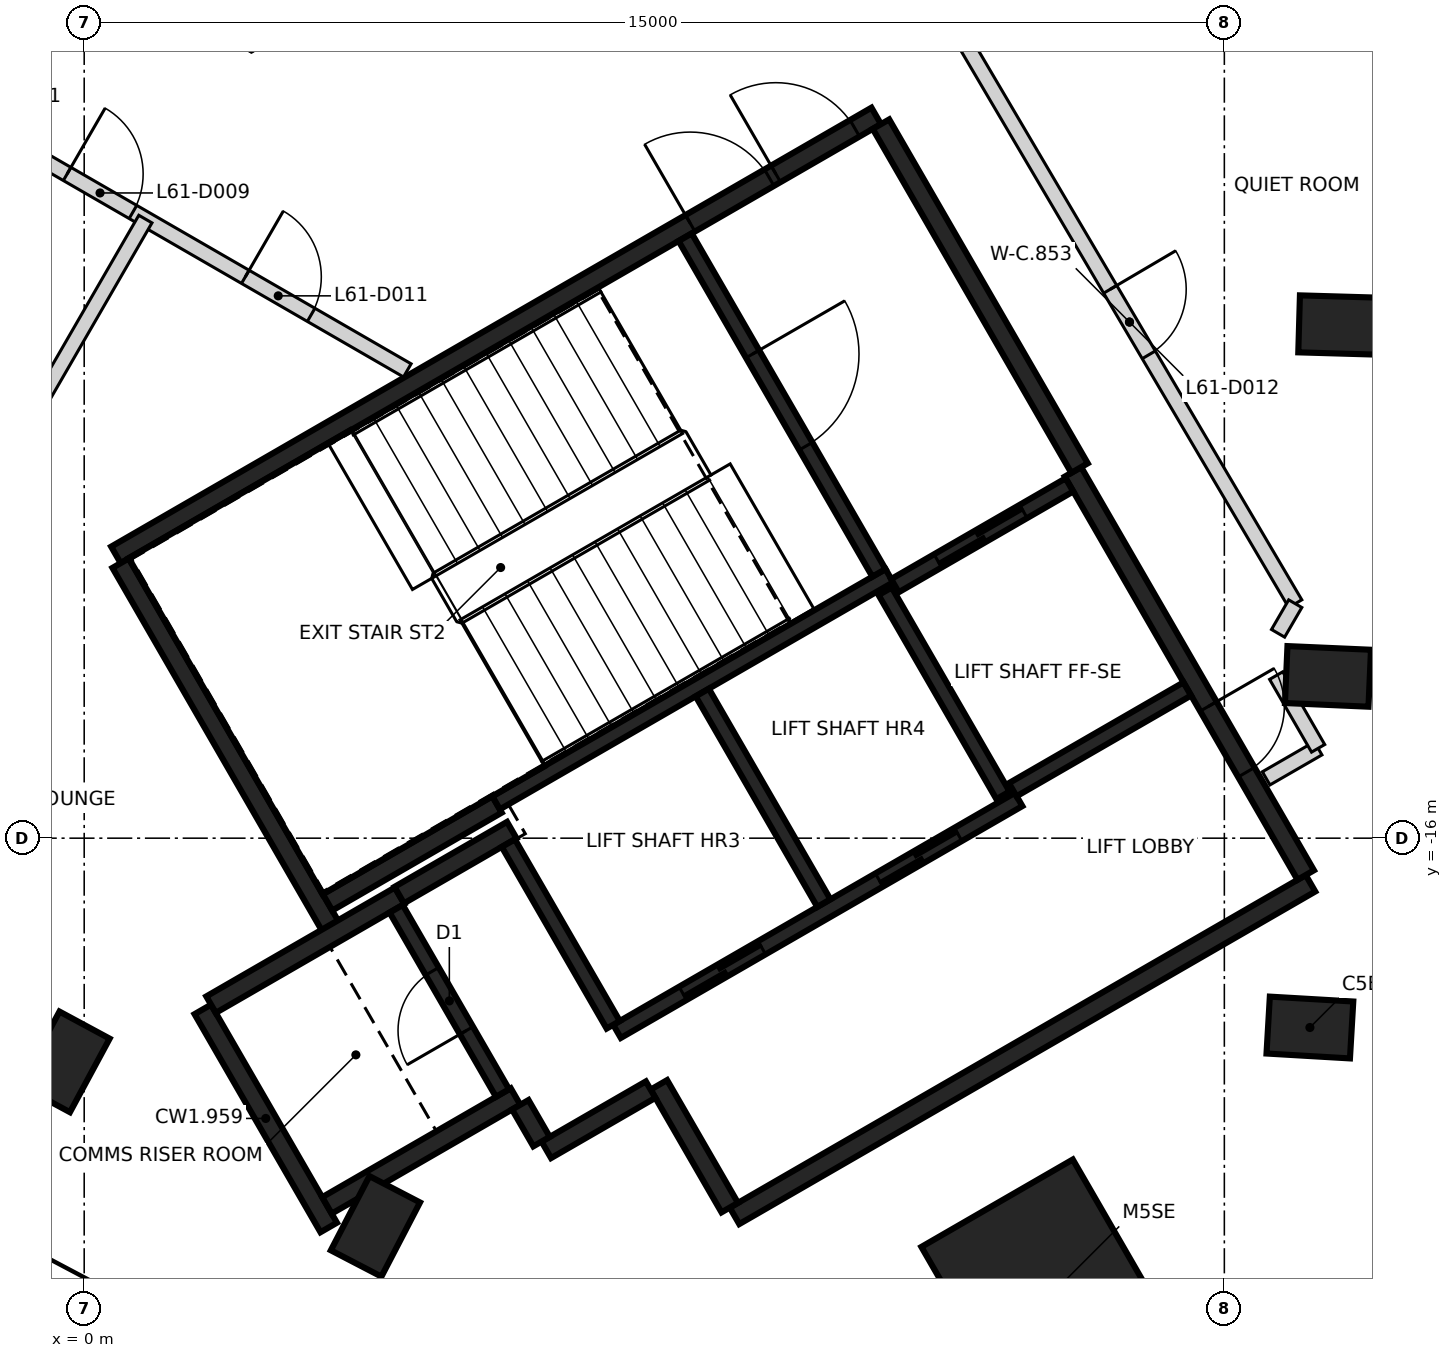
"""IFC4 building model, lengths in metres.
Left out: names, types, materials, properties, quantities, classifications, styles, units other than length and angle.
Written with IfcOpenShell. Run it as: python <this file> out.ifc"""

import sys

from ifc_helpers import new_model, si_unit, direction, frame, frame_2d, origin, origin_2d, place, context, subcontext, project, spatial, rectangle, extrude, element, fill, save


model = new_model("IFC4")
c1 = context("Model", 3, precision=1e-05, world=origin(), true_north=direction((0.0, 1.0)))
c2 = subcontext(c1, "Body", "Model", "MODEL_VIEW")
j1 = project(units=[si_unit("LENGTHUNIT", "METRE"), si_unit("PLANEANGLEUNIT", "RADIAN")], contexts=[c1])
p1 = place(None, origin())
s1 = spatial("IfcSite", under=j1, at=p1, CompositionType="ELEMENT")
p2 = place(p1, origin())
s2 = spatial("IfcBuilding", under=s1, at=p2, CompositionType="ELEMENT")
p3 = place(p2, frame((0.0, 0.0, 243.0)))
s3 = spatial("IfcBuildingStorey", under=s2, at=p3, CompositionType="ELEMENT", Elevation=243.0)
for number, where, z_axis, x_axis in (
    (1, (16.125, -18.491, -0.35), (0.0, 0.0, 1.0), (-0.998, 0.058, 0.0)),
    (2, (16.363, -13.872, -0.35), (0.0, 0.0, 1.0), (-0.999, 0.044, 0.0)),
    (3, (16.533, -9.25, -0.35), (0.0, 0.0, 1.0), (-1.0, 0.029, 0.0)),
    (4, (-0.256, -18.943, -0.35), (0.0, 0.0, 1.0), (0.475, 0.88, 0.0)),
    (5, (3.832, -21.107, -0.35), (0.0, 0.0, 1.0), (0.461, 0.887, 0.0)),
):
    element("IfcColumn", number, at=place(p3, frame(where, z_axis=z_axis, x_axis=x_axis)), inside=s3, PredefinedType="COLUMN", context=c2, shape_type="SweptSolid", body=[
        extrude(rectangle(XDim=1.1, YDim=0.75, at=origin_2d()), origin(), (0.0, 0.0, 1.0), 3.6),
    ])
p4 = place(p3, frame((12.71, -22.015, -0.35), z_axis=(0.0, 0.0, 1.0), x_axis=(-0.5, 0.866025403784, 0.0)))
e6 = element("IfcColumn", 6, at=p4, inside=s3, PredefinedType="COLUMN", context=c2, shape_type="SweptSolid", body=[
    extrude(rectangle(XDim=2.8, YDim=2.3, at=origin_2d()), origin(), (0.0, 0.0, 1.0), 3.6),
])
p5 = place(p3, frame((0.417, -12.273, 0.0), z_axis=(0.0, 0.0, 1.0), x_axis=(0.866021906294, 0.500006057782, 0.0)))
e7 = element("IfcWall", 7, at=p5, inside=s3, PredefinedType="SHEAR", context=c2, shape_type="SweptSolid", body=[
    extrude(rectangle(XDim=11.55, YDim=0.25, at=frame_2d((5.775, 0.0))), origin(), (0.0, 0.0, 1.0), 3.25),
])
p6 = place(p5, frame((10.025, 0.0, 0.0)))
e8 = element("IfcOpeningElement", 8, at=p6, cuts=e7, PredefinedType="OPENING", context=c2, shape_type="SweptSolid", body=[
    extrude(rectangle(XDim=1.2, YDim=2.1, at=frame_2d((0.6, 1.05))), frame((0.0, 0.135, 0.0), z_axis=(0.0, -1.0, 0.0), x_axis=(1.0, 0.0, 0.0)), (0.0, 0.0, 1.0), 0.27),
])
p7 = place(p5, frame((8.725, 0.0, 0.0)))
e9 = element("IfcOpeningElement", 9, at=p7, cuts=e7, PredefinedType="OPENING", context=c2, shape_type="SweptSolid", body=[
    extrude(rectangle(XDim=1.2, YDim=2.1, at=frame_2d((0.6, 1.05))), frame((0.0, 0.135, 0.0), z_axis=(0.0, -1.0, 0.0), x_axis=(1.0, 0.0, 0.0)), (0.0, 0.0, 1.0), 0.27),
])
p8 = place(p3, frame((16.133, -16.594, 0.0), z_axis=(0.0, 0.0, 1.0), x_axis=(-0.866022959057, -0.500004234368, 0.0)))
e10 = element("IfcWall", 10, at=p8, inside=s3, PredefinedType="SHEAR", context=c2, shape_type="SweptSolid", body=[
    extrude(rectangle(XDim=8.75, YDim=0.25, at=frame_2d((4.375, 0.0))), origin(), (0.0, 0.0, 1.0), 3.25),
])
p9 = place(p3, frame((13.008, -11.181, 0.0), z_axis=(0.0, 0.0, 1.0), x_axis=(0.500001955336, -0.866024274868, 0.0)))
e11 = element("IfcWall", 11, at=p9, inside=s3, PredefinedType="SHEAR", context=c2, shape_type="SweptSolid", body=[
    extrude(rectangle(XDim=6.125, YDim=0.25, at=frame_2d((3.062, 0.0))), origin(), (0.0, 0.0, 1.0), 3.25),
])
p10 = place(p9, frame((3.563, 0.0, 0.0)))
e12 = element("IfcOpeningElement", 12, at=p10, cuts=e11, PredefinedType="OPENING", context=c2, shape_type="SweptSolid", body=[
    extrude(rectangle(XDim=1.0, YDim=2.1, at=frame_2d((0.5, 1.05))), frame((0.0, 0.135, 0.0), z_axis=(0.0, -1.0, 0.0), x_axis=(1.0, 0.0, 0.0)), (0.0, 0.0, 1.0), 0.27),
])
p11 = place(p3, frame((3.235, -17.153, 0.0), z_axis=(0.0, 0.0, 1.0), x_axis=(-0.500008851346, 0.866020293397, 0.0)))
e13 = element("IfcWall", 13, at=p11, inside=s3, PredefinedType="SHEAR", context=c2, shape_type="SweptSolid", body=[
    extrude(rectangle(XDim=5.51, YDim=0.25, at=frame_2d((2.755, 0.0))), origin(), (0.0, 0.0, 1.0), 3.25),
])
p12 = place(p3, frame((10.483, -6.606, 0.0), z_axis=(0.0, 0.0, 1.0), x_axis=(0.49999885962, -0.866026062182, 0.0)))
e14 = element("IfcWall", 14, at=p12, inside=s3, PredefinedType="SHEAR", context=c2, shape_type="SweptSolid", body=[
    extrude(rectangle(XDim=5.225, YDim=0.25, at=frame_2d((2.612, 0.0))), origin(), (0.0, 0.0, 1.0), 3.25),
])
p13 = place(p3, frame((3.217, -21.122, 0.0), z_axis=(0.0, 0.0, 1.0), x_axis=(-0.499998874531, 0.866026053573, 0.0)))
e15 = element("IfcWall", 15, at=p13, inside=s3, PredefinedType="SHEAR", context=c2, shape_type="SweptSolid", body=[
    extrude(rectangle(XDim=3.313, YDim=0.25, at=frame_2d((1.656, 0.0))), origin(), (0.0, 0.0, 1.0), 3.25),
])
p14 = place(p3, frame((1.669, -18.19, 0.0), z_axis=(0.0, 0.0, 1.0), x_axis=(0.866042235819, 0.499970844928, 0.0)))
e16 = element("IfcWall", 16, at=p14, inside=s3, PredefinedType="SHEAR", context=c2, shape_type="SweptSolid", body=[
    extrude(rectangle(XDim=2.865, YDim=0.25, at=frame_2d((1.432, 0.0))), origin(), (0.0, 0.0, 1.0), 3.25),
])
p15 = place(p3, frame((5.675, -19.399, 0.0), z_axis=(0.0, 0.0, 1.0), x_axis=(-0.866026637627, -0.499997862916, 0.0)))
e17 = element("IfcWall", 17, at=p15, inside=s3, PredefinedType="SHEAR", context=c2, shape_type="SweptSolid", body=[
    extrude(rectangle(XDim=2.865, YDim=0.25, at=frame_2d((1.432, 0.0))), origin(), (0.0, 0.0, 1.0), 3.25),
])
p16 = place(p3, frame((5.431, -15.556, 0.0), z_axis=(0.0, 0.0, 1.0), x_axis=(-0.866022940537, -0.500004266446, 0.0)))
e18 = element("IfcWall", 18, at=p16, inside=s3, PredefinedType="SHEAR", context=c2, shape_type="SweptSolid", body=[
    extrude(rectangle(XDim=2.575, YDim=0.25, at=frame_2d((1.287, 0.0))), origin(), (0.0, 0.0, 1.0), 3.25),
])
p17 = place(p3, frame((8.493, -20.86, 0.0), z_axis=(0.0, 0.0, 1.0), x_axis=(-0.500039802285, 0.866002422705, 0.0)))
e19 = element("IfcWall", 19, at=p17, inside=s3, PredefinedType="SHEAR", context=c2, shape_type="SweptSolid", body=[
    extrude(rectangle(XDim=1.865, YDim=0.25, at=frame_2d((0.932, 0.0))), origin(), (0.0, 0.0, 1.0), 3.25),
])
p18 = place(p3, frame((4.145, -16.749, 0.0), z_axis=(0.0, 0.0, 1.0), x_axis=(0.866038183914, 0.499977863513, 0.0)))
e20 = element("IfcWall", 20, at=p18, inside=s3, PredefinedType="SHEAR", context=c2, shape_type="SweptSolid", body=[
    extrude(rectangle(XDim=1.71, YDim=0.25, at=frame_2d((0.855, 0.0))), origin(), (0.0, 0.0, 1.0), 3.25),
])
p19 = place(p3, frame((7.452, -19.308, 0.0), z_axis=(0.0, 0.0, 1.0), x_axis=(-0.866044474677, -0.49996696679, 0.0)))
e21 = element("IfcWall", 21, at=p19, inside=s3, PredefinedType="SHEAR", context=c2, shape_type="SweptSolid", body=[
    extrude(rectangle(XDim=1.584, YDim=0.25, at=frame_2d((0.792, 0.0))), origin(), (0.0, 0.0, 1.0), 3.25),
])
p20 = place(p3, frame((6.017, -19.992, 0.0), z_axis=(0.0, 0.0, 1.0), x_axis=(-0.500364886717, 0.865814633822, 0.0)))
e22 = element("IfcWall", 22, at=p20, inside=s3, PredefinedType="SHEAR", context=c2, shape_type="SweptSolid", body=[
    extrude(rectangle(XDim=0.559, YDim=0.25, at=frame_2d((0.28, 0.0))), origin(), (0.0, 0.0, 1.0), 3.25),
])
p21 = place(p3, frame((5.419, -15.534, 0.0), z_axis=(0.0, 0.0, 1.0), x_axis=(0.866029065029, 0.499993658486, 0.0)))
e23 = element("IfcWall", 23, at=p21, inside=s3, PredefinedType="SHEAR", context=c2, shape_type="SweptSolid", body=[
    extrude(rectangle(XDim=5.974, YDim=0.2, at=frame_2d((2.987, 0.0))), origin(), (0.0, 0.0, 1.0), 3.25),
])
p22 = place(p3, frame((7.01, -18.542, 0.0), z_axis=(0.0, 0.0, 1.0), x_axis=(0.866030299012, 0.499991521122, 0.0)))
e24 = element("IfcWall", 24, at=p22, inside=s3, PredefinedType="SHEAR", context=c2, shape_type="SweptSolid", body=[
    extrude(rectangle(XDim=6.1, YDim=0.2, at=frame_2d((3.05, 0.0))), origin(), (0.0, 0.0, 1.0), 3.25),
])
p23 = place(p22, frame((1.0, 0.0, 0.0)))
e25 = element("IfcOpeningElement", 25, at=p23, cuts=e24, PredefinedType="OPENING", context=c2, shape_type="SweptSolid", body=[
    extrude(rectangle(XDim=1.2, YDim=2.1, at=frame_2d((0.6, 1.05))), frame((0.0, 0.11, 0.0), z_axis=(0.0, -1.0, 0.0), x_axis=(1.0, 0.0, 0.0)), (0.0, 0.0, 1.0), 0.22),
])
p24 = place(p22, frame((3.982, 0.0, 0.0)))
e26 = element("IfcOpeningElement", 26, at=p24, cuts=e24, PredefinedType="OPENING", context=c2, shape_type="SweptSolid", body=[
    extrude(rectangle(XDim=1.2, YDim=2.1, at=frame_2d((0.6, 1.05))), frame((0.0, 0.11, 0.0), z_axis=(0.0, -1.0, 0.0), x_axis=(1.0, 0.0, 0.0)), (0.0, 0.0, 1.0), 0.22),
])
p25 = place(p3, frame((7.906, -8.094, 0.0), z_axis=(0.0, 0.0, 1.0), x_axis=(0.500027839223, -0.866009330205, 0.0)))
e27 = element("IfcWall", 27, at=p25, inside=s3, PredefinedType="SHEAR", context=c2, shape_type="SweptSolid", body=[
    extrude(rectangle(XDim=5.098, YDim=0.2, at=frame_2d((2.549, 0.0))), origin(), (0.0, 0.0, 1.0), 3.25),
])
p26 = place(p25, frame((1.774, 0.0, 0.0)))
e28 = element("IfcOpeningElement", 28, at=p26, cuts=e27, PredefinedType="OPENING", context=c2, shape_type="SweptSolid", body=[
    extrude(rectangle(XDim=1.4, YDim=2.1, at=frame_2d((0.7, 1.05))), frame((0.0, 0.11, 0.0), z_axis=(0.0, -1.0, 0.0), x_axis=(1.0, 0.0, 0.0)), (0.0, 0.0, 1.0), 0.22),
])
p27 = place(p3, frame((8.132, -14.084, 0.0), z_axis=(0.0, 0.0, 1.0), x_axis=(0.499997778408, -0.866026686418, 0.0)))
e29 = element("IfcWall", 29, at=p27, inside=s3, PredefinedType="SHEAR", context=c2, shape_type="SweptSolid", body=[
    extrude(rectangle(XDim=3.198, YDim=0.2, at=frame_2d((1.599, 0.0))), origin(), (0.0, 0.0, 1.0), 3.25),
])
p28 = place(p3, frame((5.503, -19.352, 0.0), z_axis=(0.0, 0.0, 1.0), x_axis=(-0.499986818241, 0.866033014143, 0.0)))
e30 = element("IfcWall", 30, at=p28, inside=s3, PredefinedType="SHEAR", context=c2, shape_type="SweptSolid", body=[
    extrude(rectangle(XDim=2.798, YDim=0.2, at=frame_2d((1.399, 0.0))), origin(), (0.0, 0.0, 1.0), 3.25),
])
p29 = place(p28, frame((0.949, 0.0, 0.0)))
e31 = element("IfcOpeningElement", 31, at=p29, cuts=e30, PredefinedType="OPENING", context=c2, shape_type="SweptSolid", body=[
    extrude(rectangle(XDim=0.9, YDim=2.1, at=frame_2d((0.45, 1.05))), frame((0.0, 0.11, 0.0), z_axis=(0.0, -1.0, 0.0), x_axis=(1.0, 0.0, 0.0)), (0.0, 0.0, 1.0), 0.22),
])
p30 = place(p3, frame((6.96, -18.455, 0.0), z_axis=(0.0, 0.0, 1.0), x_axis=(-0.499926705758, 0.866067716099, 0.0)))
e32 = element("IfcWall", 32, at=p30, inside=s3, PredefinedType="SHEAR", context=c2, shape_type="SweptSolid", body=[
    extrude(rectangle(XDim=2.759, YDim=0.2, at=frame_2d((1.38, 0.0))), origin(), (0.0, 0.0, 1.0), 3.25),
])
p31 = place(p3, frame((12.088, -15.437, 0.0), z_axis=(0.0, 0.0, 1.0), x_axis=(-0.500026960575, 0.86600983753, 0.0)))
e33 = element("IfcWall", 33, at=p31, inside=s3, PredefinedType="SHEAR", context=c2, shape_type="SweptSolid", body=[
    extrude(rectangle(XDim=3.1, YDim=0.2, at=frame_2d((1.55, 0.0))), origin(), (0.0, 0.0, 1.0), 3.25),
])
p32 = place(p3, frame((10.666, -12.678, 0.0), z_axis=(0.0, 0.0, 1.0), x_axis=(0.866018407898, 0.500012117035, 0.0)))
e34 = element("IfcWall", 34, at=p32, inside=s3, PredefinedType="SHEAR", context=c2, shape_type="SweptSolid", body=[
    extrude(rectangle(XDim=2.651, YDim=0.2, at=frame_2d((1.325, 0.0))), origin(), (0.0, 0.0, 1.0), 3.25),
])
p33 = place(p32, frame((0.652, 0.0, 0.0)))
e35 = element("IfcOpeningElement", 35, at=p33, cuts=e34, PredefinedType="OPENING", context=c2, shape_type="SweptSolid", body=[
    extrude(rectangle(XDim=1.3, YDim=2.1, at=frame_2d((0.65, 1.05))), frame((0.0, 0.11, 0.0), z_axis=(0.0, -1.0, 0.0), x_axis=(1.0, 0.0, 0.0)), (0.0, 0.0, 1.0), 0.22),
])
p34 = place(p3, frame((14.512, -14.037, 0.0), z_axis=(0.0, 0.0, 1.0), x_axis=(-0.866018407898, -0.500012117035, 0.0)))
e36 = element("IfcWall", 36, at=p34, inside=s3, PredefinedType="SHEAR", context=c2, shape_type="SweptSolid", body=[
    extrude(rectangle(XDim=2.651, YDim=0.2, at=frame_2d((1.325, 0.0))), origin(), (0.0, 0.0, 1.0), 3.25),
])
p35 = place(p3, frame((-7.289, -3.182, 0.0), z_axis=(0.0, 0.0, 1.0), x_axis=(0.865979329032, -0.500079795322, 0.0)))
e37 = element("IfcWall", 37, at=p35, inside=s3, PredefinedType="PARTITIONING", context=c2, shape_type="SweptSolid", body=[
    extrude(rectangle(XDim=13.326, YDim=0.2, at=frame_2d((6.663, 0.0))), origin(), (0.0, 0.0, 1.0), 3.25),
])
p36 = place(p35, frame((8.158, 0.0, 0.0)))
e38 = element("IfcOpeningElement", 38, at=p36, cuts=e37, PredefinedType="OPENING", context=c2, shape_type="SweptSolid", body=[
    extrude(rectangle(XDim=1.0, YDim=2.1, at=frame_2d((0.5, 1.05))), frame((0.0, 0.11, 0.0), z_axis=(0.0, -1.0, 0.0), x_axis=(1.0, 0.0, 0.0)), (0.0, 0.0, 1.0), 0.22),
])
p37 = place(p35, frame((10.865, 0.0, 0.0)))
e39 = element("IfcOpeningElement", 39, at=p37, cuts=e37, PredefinedType="OPENING", context=c2, shape_type="SweptSolid", body=[
    extrude(rectangle(XDim=1.0, YDim=2.1, at=frame_2d((0.5, 1.05))), frame((0.0, 0.11, 0.0), z_axis=(0.0, -1.0, 0.0), x_axis=(1.0, 0.0, 0.0)), (0.0, 0.0, 1.0), 0.22),
])
p38 = place(p3, frame((11.571, -5.505, 0.0), z_axis=(0.0, 0.0, 1.0), x_axis=(0.507291838928, -0.861774326699, 0.0)))
e40 = element("IfcWall", 40, at=p38, inside=s3, PredefinedType="PARTITIONING", context=c2, shape_type="SweptSolid", body=[
    extrude(rectangle(XDim=8.599, YDim=0.2, at=frame_2d((4.299, 0.0))), origin(), (0.0, 0.0, 1.0), 3.25),
])
p39 = place(p38, frame((3.799, 0.0, 0.0)))
e41 = element("IfcOpeningElement", 41, at=p39, cuts=e40, PredefinedType="OPENING", context=c2, shape_type="SweptSolid", body=[
    extrude(rectangle(XDim=1.0, YDim=2.1, at=frame_2d((0.5, 1.05))), frame((0.0, 0.11, 0.0), z_axis=(0.0, -1.0, 0.0), x_axis=(1.0, 0.0, 0.0)), (0.0, 0.0, 1.0), 0.22),
])
p40 = place(p3, frame((15.55, -15.213, 0.0), z_axis=(0.0, 0.0, 1.0), x_axis=(0.865989998118, 0.500061319399, 0.0)))
e42 = element("IfcWall", 42, at=p40, inside=s3, PredefinedType="PARTITIONING", context=c2, shape_type="SweptSolid", body=[
    extrude(rectangle(XDim=0.79, YDim=0.2, at=frame_2d((0.395, 0.0))), origin(), (0.0, 0.0, 1.0), 2.35),
])
p41 = place(p3, frame((15.933, -12.915, 0.0), z_axis=(0.0, 0.0, 1.0), x_axis=(-0.502017930819, -0.864857211993, 0.0)))
e43 = element("IfcWall", 43, at=p41, inside=s3, PredefinedType="PARTITIONING", context=c2, shape_type="SweptSolid", body=[
    extrude(rectangle(XDim=0.451, YDim=0.2, at=frame_2d((0.226, 0.0))), origin(), (0.0, 0.0, 1.0), 3.25),
])
p42 = place(p3, frame((15.682, -13.861, 0.0), z_axis=(0.0, 0.0, 1.0), x_axis=(0.499633176362, -0.866237085952, 0.0)))
e44 = element("IfcWall", 44, at=p42, inside=s3, PredefinedType="PARTITIONING", context=c2, shape_type="SweptSolid", body=[
    extrude(rectangle(XDim=1.105, YDim=0.2, at=frame_2d((0.552, 0.0))), origin(), (0.0, 0.0, 1.0), 2.35),
])
p43 = place(p3, frame((-5.503, -18.781, 0.0), z_axis=(0.0, 0.0, 1.0), x_axis=(0.499968699423, 0.866043474427, 0.0)))
e45 = element("IfcWall", 45, at=p43, inside=s3, PredefinedType="PARTITIONING", context=c2, shape_type="SweptSolid", body=[
    extrude(rectangle(XDim=12.616, YDim=0.2, at=frame_2d((6.308, 0.0))), origin(), (0.0, 0.0, 1.0), 3.25),
])
p44 = place(p3, frame((18.746, -13.872, 0.0), z_axis=(0.0, 0.0, 1.0), x_axis=(-1.0, 0.0, 0.0)))
e46 = element("IfcWall", 46, at=p44, inside=s3, PredefinedType="PARTITIONING", context=c2, shape_type="SweptSolid", body=[
    extrude(rectangle(XDim=2.711, YDim=0.2, at=frame_2d((1.356, 0.0))), origin(), (0.0, 0.0, 1.0), 3.25),
])
p45 = place(p33, origin())
e47 = element("IfcDoor", 47, at=p45, inside=s3, OperationType="SLIDING_TO_LEFT", PredefinedType="DOOR", context=c2, shape_type="SweptSolid", body=[
    extrude(rectangle(XDim=1.3, YDim=2.1, at=frame_2d((0.65, 1.05))), frame((0.0, 0.025, 0.0), z_axis=(0.0, -1.0, 0.0), x_axis=(1.0, 0.0, 0.0)), (0.0, 0.0, 1.0), 0.05),
])
fill(e35, e47)
p46 = place(p23, origin())
e48 = element("IfcDoor", 48, at=p46, inside=s3, OperationType="DOUBLE_DOOR_SLIDING", PredefinedType="DOOR", context=c2, shape_type="SweptSolid", body=[
    extrude(rectangle(XDim=1.2, YDim=2.1, at=frame_2d((0.6, 1.05))), frame((0.0, 0.025, 0.0), z_axis=(0.0, -1.0, 0.0), x_axis=(1.0, 0.0, 0.0)), (0.0, 0.0, 1.0), 0.05),
])
fill(e25, e48)
p47 = place(p24, origin())
e49 = element("IfcDoor", 49, at=p47, inside=s3, OperationType="DOUBLE_DOOR_SLIDING", PredefinedType="DOOR", context=c2, shape_type="SweptSolid", body=[
    extrude(rectangle(XDim=1.2, YDim=2.1, at=frame_2d((0.6, 1.05))), frame((0.0, 0.025, 0.0), z_axis=(0.0, -1.0, 0.0), x_axis=(1.0, 0.0, 0.0)), (0.0, 0.0, 1.0), 0.05),
])
fill(e26, e49)
p48 = place(p10, origin())
e50 = element("IfcDoor", 50, at=p48, inside=s3, OperationType="SINGLE_SWING_LEFT", PredefinedType="DOOR", context=c2, shape_type="SweptSolid", body=[
    extrude(rectangle(XDim=1.0, YDim=2.1, at=frame_2d((0.5, 1.05))), frame((0.0, 0.025, 0.0), z_axis=(0.0, -1.0, 0.0), x_axis=(1.0, 0.0, 0.0)), (0.0, 0.0, 1.0), 0.05),
])
fill(e12, e50)
p49 = place(p6, origin())
e51 = element("IfcDoor", 51, at=p49, inside=s3, OperationType="SINGLE_SWING_LEFT", PredefinedType="DOOR", context=c2, shape_type="SweptSolid", body=[
    extrude(rectangle(XDim=1.2, YDim=2.1, at=frame_2d((0.6, 1.05))), frame((0.0, 0.025, 0.0), z_axis=(0.0, -1.0, 0.0), x_axis=(1.0, 0.0, 0.0)), (0.0, 0.0, 1.0), 0.05),
])
fill(e8, e51)
p50 = place(p7, origin())
e52 = element("IfcDoor", 52, at=p50, inside=s3, OperationType="SINGLE_SWING_RIGHT", PredefinedType="DOOR", context=c2, shape_type="SweptSolid", body=[
    extrude(rectangle(XDim=1.2, YDim=2.1, at=frame_2d((0.6, 1.05))), frame((0.0, 0.025, 0.0), z_axis=(0.0, -1.0, 0.0), x_axis=(1.0, 0.0, 0.0)), (0.0, 0.0, 1.0), 0.05),
])
fill(e9, e52)
p51 = place(p26, origin())
e53 = element("IfcDoor", 53, at=p51, inside=s3, OperationType="SINGLE_SWING_LEFT", PredefinedType="DOOR", context=c2, shape_type="SweptSolid", body=[
    extrude(rectangle(XDim=1.4, YDim=2.1, at=frame_2d((0.7, 1.05))), frame((0.0, 0.025, 0.0), z_axis=(0.0, -1.0, 0.0), x_axis=(1.0, 0.0, 0.0)), (0.0, 0.0, 1.0), 0.05),
])
fill(e28, e53)
p52 = place(p29, origin())
e54 = element("IfcDoor", 54, at=p52, inside=s3, OperationType="SINGLE_SWING_RIGHT", PredefinedType="DOOR", context=c2, shape_type="SweptSolid", body=[
    extrude(rectangle(XDim=0.9, YDim=2.1, at=frame_2d((0.45, 1.05))), frame((0.0, 0.025, 0.0), z_axis=(0.0, -1.0, 0.0), x_axis=(1.0, 0.0, 0.0)), (0.0, 0.0, 1.0), 0.05),
])
fill(e31, e54)
p53 = place(p36, frame((1.0, 0.0, 0.0), z_axis=(0.0, 0.0, 1.0), x_axis=(-1.0, 0.0, 0.0)))
e55 = element("IfcDoor", 55, at=p53, inside=s3, OperationType="SINGLE_SWING_LEFT", PredefinedType="DOOR", context=c2, shape_type="SweptSolid", body=[
    extrude(rectangle(XDim=1.0, YDim=2.1, at=frame_2d((0.5, 1.05))), frame((0.0, 0.025, 0.0), z_axis=(0.0, -1.0, 0.0), x_axis=(1.0, 0.0, 0.0)), (0.0, 0.0, 1.0), 0.05),
])
fill(e38, e55)
p54 = place(p37, frame((1.0, 0.0, 0.0), z_axis=(0.0, 0.0, 1.0), x_axis=(-1.0, 0.0, 0.0)))
e56 = element("IfcDoor", 56, at=p54, inside=s3, OperationType="SINGLE_SWING_LEFT", PredefinedType="DOOR", context=c2, shape_type="SweptSolid", body=[
    extrude(rectangle(XDim=1.0, YDim=2.1, at=frame_2d((0.5, 1.05))), frame((0.0, 0.025, 0.0), z_axis=(0.0, -1.0, 0.0), x_axis=(1.0, 0.0, 0.0)), (0.0, 0.0, 1.0), 0.05),
])
fill(e39, e56)
p55 = place(p39, origin())
e57 = element("IfcDoor", 57, at=p55, inside=s3, OperationType="SINGLE_SWING_LEFT", PredefinedType="DOOR", context=c2, shape_type="SweptSolid", body=[
    extrude(rectangle(XDim=1.0, YDim=2.1, at=frame_2d((0.5, 1.05))), frame((0.0, 0.025, 0.0), z_axis=(0.0, -1.0, 0.0), x_axis=(1.0, 0.0, 0.0)), (0.0, 0.0, 1.0), 0.05),
])
fill(e41, e57)
save(model, sys.argv[1])
